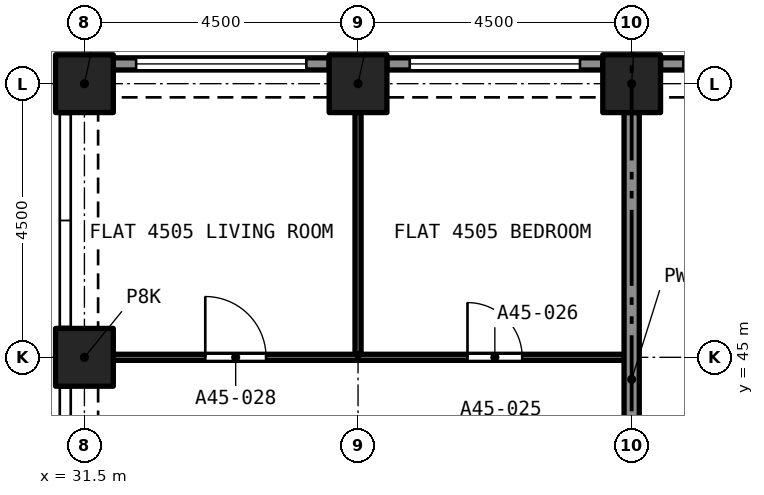
"""IFC4 building model, lengths in metres.
Left out: names, types, materials, properties, quantities, classifications, styles, units other than length and angle.
Written with IfcOpenShell. Run it as: python <this file> out.ifc"""

import sys

from ifc_helpers import new_model, si_unit, direction, frame, frame_2d, origin, origin_2d, place, context, subcontext, project, spatial, rectangle, extrude, element, fill, save


model = new_model("IFC4")
c1 = context("Model", 3, precision=1e-05, world=origin(), true_north=direction((0.0, 1.0)))
c2 = subcontext(c1, "Body", "Model", "MODEL_VIEW")
j1 = project(units=[si_unit("LENGTHUNIT", "METRE"), si_unit("PLANEANGLEUNIT", "RADIAN")], contexts=[c1])
p1 = place(None, origin())
s1 = spatial("IfcSite", under=j1, at=p1, CompositionType="ELEMENT")
p2 = place(p1, origin())
s2 = spatial("IfcBuilding", under=s1, at=p2, CompositionType="ELEMENT")
p3 = place(p2, frame((0.0, 0.0, 163.8)))
s3 = spatial("IfcBuildingStorey", under=s2, at=p3, CompositionType="ELEMENT", Elevation=163.8)
for number, where, z_axis, x_axis in (
    (1, (31.5, 45.0, 0.0), (0.0, 0.0, 1.0), (1.0, 0.0, 0.0)),
    (2, (31.5, 49.5, 0.0), (0.0, 0.0, 1.0), (1.0, 0.0, 0.0)),
    (3, (36.0, 49.5, 0.0), (0.0, 0.0, 1.0), (1.0, 0.0, 0.0)),
    (4, (40.5, 49.5, 0.0), (0.0, 0.0, 1.0), (1.0, 0.0, 0.0)),
):
    element("IfcColumn", number, at=place(p3, frame(where, z_axis=z_axis, x_axis=x_axis)), inside=s3, PredefinedType="COLUMN", context=c2, shape_type="SweptSolid", body=[
        extrude(rectangle(XDim=0.95, YDim=0.95, at=origin_2d()), origin(), (0.0, 0.0, 1.0), 4.4),
    ])
p4 = place(p3, frame((40.975, 49.825, 0.0), z_axis=(0.0, 0.0, 1.0), x_axis=(1.0, 0.0, 0.0)))
e5 = element("IfcWall", 5, at=p4, inside=s3, PredefinedType="SOLIDWALL", context=c2, shape_type="SweptSolid", body=[
    extrude(rectangle(XDim=3.55, YDim=0.2, at=frame_2d((1.775, 0.0))), origin(), (0.0, 0.0, 1.0), 4.4),
])
p5 = place(p4, frame((0.375, 0.0, 0.45)))
e6 = element("IfcOpeningElement", 6, at=p5, cuts=e5, PredefinedType="OPENING", context=c2, shape_type="SweptSolid", body=[
    extrude(rectangle(XDim=2.8, YDim=2.55, at=frame_2d((1.4, 1.275))), frame((0.0, 0.11, 0.0), z_axis=(0.0, -1.0, 0.0), x_axis=(1.0, 0.0, 0.0)), (0.0, 0.0, 1.0), 0.22),
])
p6 = place(p3, frame((36.475, 49.825, 0.0), z_axis=(0.0, 0.0, 1.0), x_axis=(1.0, 0.0, 0.0)))
e7 = element("IfcWall", 7, at=p6, inside=s3, PredefinedType="SOLIDWALL", context=c2, shape_type="SweptSolid", body=[
    extrude(rectangle(XDim=3.55, YDim=0.2, at=frame_2d((1.775, 0.0))), origin(), (0.0, 0.0, 1.0), 4.4),
])
p7 = place(p6, frame((0.375, 0.0, 0.45)))
e8 = element("IfcOpeningElement", 8, at=p7, cuts=e7, PredefinedType="OPENING", context=c2, shape_type="SweptSolid", body=[
    extrude(rectangle(XDim=2.8, YDim=2.55, at=frame_2d((1.4, 1.275))), frame((0.0, 0.11, 0.0), z_axis=(0.0, -1.0, 0.0), x_axis=(1.0, 0.0, 0.0)), (0.0, 0.0, 1.0), 0.22),
])
p8 = place(p3, frame((31.975, 49.825, 0.0), z_axis=(0.0, 0.0, 1.0), x_axis=(1.0, 0.0, 0.0)))
e9 = element("IfcWall", 9, at=p8, inside=s3, PredefinedType="SOLIDWALL", context=c2, shape_type="SweptSolid", body=[
    extrude(rectangle(XDim=3.55, YDim=0.2, at=frame_2d((1.775, 0.0))), origin(), (0.0, 0.0, 1.0), 4.4),
])
p9 = place(p8, frame((0.375, 0.0, 0.45)))
e10 = element("IfcOpeningElement", 10, at=p9, cuts=e9, PredefinedType="OPENING", context=c2, shape_type="SweptSolid", body=[
    extrude(rectangle(XDim=2.8, YDim=2.55, at=frame_2d((1.4, 1.275))), frame((0.0, 0.11, 0.0), z_axis=(0.0, -1.0, 0.0), x_axis=(1.0, 0.0, 0.0)), (0.0, 0.0, 1.0), 0.22),
])
p10 = place(p3, frame((36.0, 45.0, 0.0), z_axis=(0.0, 0.0, 1.0), x_axis=(1.0, 0.0, 0.0)))
e11 = element("IfcWall", 11, at=p10, inside=s3, PredefinedType="PARTITIONING", context=c2, shape_type="SweptSolid", body=[
    extrude(rectangle(XDim=4.375, YDim=0.1, at=frame_2d((2.188, 0.0))), origin(), (0.0, 0.0, 1.0), 4.1),
])
p11 = place(p10, frame((1.8, 0.0, 0.0)))
e12 = element("IfcOpeningElement", 12, at=p11, cuts=e11, PredefinedType="OPENING", context=c2, shape_type="SweptSolid", body=[
    extrude(rectangle(XDim=0.9, YDim=2.1, at=frame_2d((0.45, 1.05))), frame((0.0, 0.06, 0.0), z_axis=(0.0, -1.0, 0.0), x_axis=(1.0, 0.0, 0.0)), (0.0, 0.0, 1.0), 0.12),
])
p12 = place(p3, frame((36.0, 45.05, 0.0), z_axis=(0.0, 0.0, 1.0), x_axis=(0.0, 1.0, 0.0)))
e13 = element("IfcWall", 13, at=p12, inside=s3, PredefinedType="PARTITIONING", context=c2, shape_type="SweptSolid", body=[
    extrude(rectangle(XDim=3.975, YDim=0.1, at=frame_2d((1.987, 0.0))), origin(), (0.0, 0.0, 1.0), 4.1),
])
p13 = place(p3, frame((31.975, 45.0, 0.0), z_axis=(0.0, 0.0, 1.0), x_axis=(1.0, 0.0, 0.0)))
e14 = element("IfcWall", 14, at=p13, inside=s3, PredefinedType="PARTITIONING", context=c2, shape_type="SweptSolid", body=[
    extrude(rectangle(XDim=4.025, YDim=0.1, at=frame_2d((2.012, 0.0))), origin(), (0.0, 0.0, 1.0), 4.1),
])
p14 = place(p13, frame((1.512, 0.0, 0.0)))
e15 = element("IfcOpeningElement", 15, at=p14, cuts=e14, PredefinedType="OPENING", context=c2, shape_type="SweptSolid", body=[
    extrude(rectangle(XDim=1.0, YDim=2.1, at=frame_2d((0.5, 1.05))), frame((0.0, 0.06, 0.0), z_axis=(0.0, -1.0, 0.0), x_axis=(1.0, 0.0, 0.0)), (0.0, 0.0, 1.0), 0.12),
])
p15 = place(p3, frame((40.5, 40.25, 0.0), z_axis=(0.0, 0.0, 1.0), x_axis=(0.0, 1.0, 0.0)))
e16 = element("IfcWall", 16, at=p15, inside=s3, PredefinedType="PARTITIONING", context=c2, shape_type="SweptSolid", body=[
    extrude(rectangle(XDim=8.775, YDim=0.25, at=frame_2d((4.387, 0.0))), origin(), (0.0, 0.0, 1.0), 4.1),
])
p16 = place(p5, origin())
e17 = element("IfcWindow", 17, at=p16, inside=s3, PartitioningType="SINGLE_PANEL", PredefinedType="WINDOW", context=c2, shape_type="SweptSolid", body=[
    extrude(rectangle(XDim=2.8, YDim=2.55, at=frame_2d((1.4, 1.275))), frame((0.0, 0.03, 0.0), z_axis=(0.0, -1.0, 0.0), x_axis=(1.0, 0.0, 0.0)), (0.0, 0.0, 1.0), 0.06),
])
fill(e6, e17)
p17 = place(p7, origin())
e18 = element("IfcWindow", 18, at=p17, inside=s3, PartitioningType="SINGLE_PANEL", PredefinedType="WINDOW", context=c2, shape_type="SweptSolid", body=[
    extrude(rectangle(XDim=2.8, YDim=2.55, at=frame_2d((1.4, 1.275))), frame((0.0, 0.03, 0.0), z_axis=(0.0, -1.0, 0.0), x_axis=(1.0, 0.0, 0.0)), (0.0, 0.0, 1.0), 0.06),
])
fill(e8, e18)
p18 = place(p9, origin())
e19 = element("IfcWindow", 19, at=p18, inside=s3, PartitioningType="SINGLE_PANEL", PredefinedType="WINDOW", context=c2, shape_type="SweptSolid", body=[
    extrude(rectangle(XDim=2.8, YDim=2.55, at=frame_2d((1.4, 1.275))), frame((0.0, 0.03, 0.0), z_axis=(0.0, -1.0, 0.0), x_axis=(1.0, 0.0, 0.0)), (0.0, 0.0, 1.0), 0.06),
])
fill(e10, e19)
p19 = place(p11, origin())
e20 = element("IfcDoor", 20, at=p19, inside=s3, OperationType="SINGLE_SWING_RIGHT", PredefinedType="DOOR", context=c2, shape_type="SweptSolid", body=[
    extrude(rectangle(XDim=0.9, YDim=2.1, at=frame_2d((0.45, 1.05))), frame((0.0, 0.025, 0.0), z_axis=(0.0, -1.0, 0.0), x_axis=(1.0, 0.0, 0.0)), (0.0, 0.0, 1.0), 0.05),
])
fill(e12, e20)
p20 = place(p14, origin())
e21 = element("IfcDoor", 21, at=p20, inside=s3, OperationType="SINGLE_SWING_LEFT", PredefinedType="DOOR", context=c2, shape_type="SweptSolid", body=[
    extrude(rectangle(XDim=1.0, YDim=2.1, at=frame_2d((0.5, 1.05))), frame((0.0, 0.025, 0.0), z_axis=(0.0, -1.0, 0.0), x_axis=(1.0, 0.0, 0.0)), (0.0, 0.0, 1.0), 0.05),
])
fill(e15, e21)
save(model, sys.argv[1])
